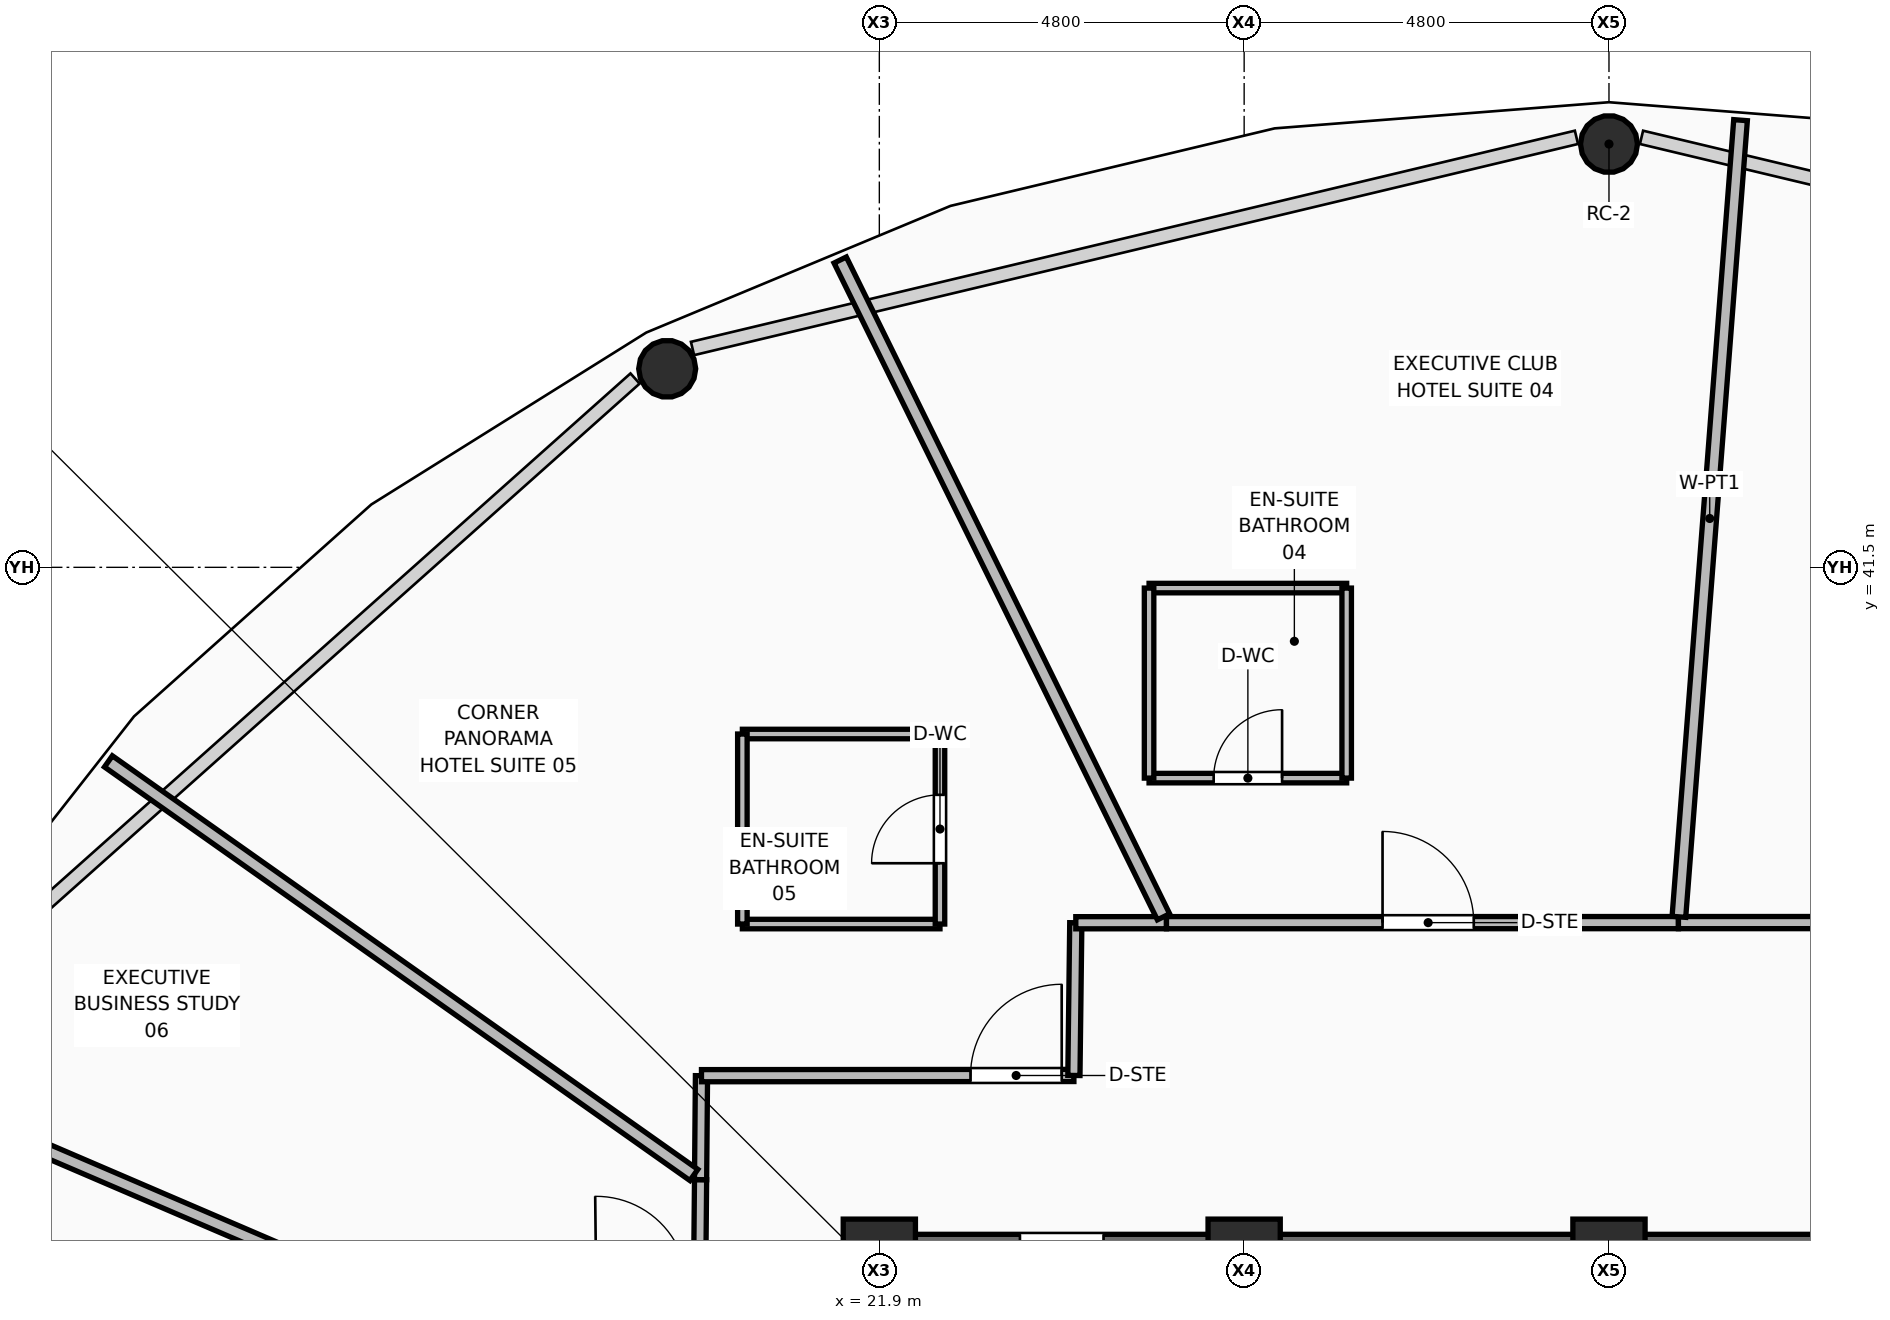
"""IFC4 building model, lengths in metres.
Left out: names, types, materials, properties, quantities, classifications, styles, units other than length and angle.
Written with IfcOpenShell. Run it as: python <this file> out.ifc"""

import sys

from ifc_helpers import new_model, si_unit, direction, frame, frame_2d, origin, origin_2d, place, context, subcontext, project, spatial, rectangle, hollow_circle, extrude, element, fill, save


model = new_model("IFC4")
c1 = context("Model", 3, precision=1e-05, world=origin(), true_north=direction((0.0, 1.0)))
c2 = subcontext(c1, "Body", "Model", "MODEL_VIEW")
j1 = project(units=[si_unit("LENGTHUNIT", "METRE"), si_unit("PLANEANGLEUNIT", "RADIAN")], contexts=[c1])
p1 = place(None, origin())
s1 = spatial("IfcSite", under=j1, at=p1, CompositionType="ELEMENT")
p2 = place(p1, origin())
s2 = spatial("IfcBuilding", under=s1, at=p2, CompositionType="ELEMENT")
p3 = place(p2, frame((0.0, 0.0, 149.7)))
s3 = spatial("IfcBuildingStorey", under=s2, at=p3, CompositionType="ELEMENT", Elevation=149.7)
for number, where, z_axis, x_axis in (
    (1, (21.9, 32.45, 0.0), (0.0, 0.0, 1.0), (1.0, 0.0, 0.0)),
    (2, (26.7, 32.45, 0.0), (0.0, 0.0, 1.0), (1.0, 0.0, 0.0)),
    (3, (31.5, 32.45, 0.0), (0.0, 0.0, 1.0), (1.0, 0.0, 0.0)),
):
    element("IfcColumn", number, at=place(p3, frame(where, z_axis=z_axis, x_axis=x_axis)), inside=s3, PredefinedType="COLUMN", context=c2, shape_type="SweptSolid", body=[
        extrude(rectangle(XDim=0.95, YDim=0.95, at=origin_2d()), origin(), (0.0, 0.0, 1.0), 3.75),
    ])
for number, where, z_axis, x_axis in (
    (4, (31.5, 47.069, 0.0), (0.0, 0.0, 1.0), (1.0, 0.0, 0.0)),
    (5, (19.109, 44.112, 0.0), (0.0, 0.0, 1.0), (1.0, 0.0, 0.0)),
):
    element("IfcColumn", number, at=place(p3, frame(where, z_axis=z_axis, x_axis=x_axis)), inside=s3, PredefinedType="COLUMN", context=c2, shape_type="SweptSolid", body=[
        extrude(hollow_circle(Radius=0.375, WallThickness=0.035, at=origin_2d()), origin(), (0.0, 0.0, 1.0), 3.57),
    ])
p4 = place(p3, frame((21.625, 32.45, 0.0), z_axis=(0.0, 0.0, 1.0), x_axis=(1.0, 0.0, 0.0)))
e6 = element("IfcWall", 6, at=p4, inside=s3, PredefinedType="SHEAR", context=c2, shape_type="SweptSolid", body=[
    extrude(rectangle(XDim=19.75, YDim=0.55, at=frame_2d((9.875, 0.0))), origin(), (0.0, 0.0, 1.0), 3.57),
])
p5 = place(p4, frame((2.125, 0.0, 0.0)))
e7 = element("IfcOpeningElement", 7, at=p5, cuts=e6, PredefinedType="OPENING", context=c2, shape_type="SweptSolid", body=[
    extrude(rectangle(XDim=1.1, YDim=2.1, at=frame_2d((0.55, 1.05))), frame((0.0, 0.285, 0.0), z_axis=(0.0, -1.0, 0.0), x_axis=(1.0, 0.0, 0.0)), (0.0, 0.0, 1.0), 0.57),
])
p6 = place(p4, frame((15.515, 0.0, 0.0)))
e8 = element("IfcOpeningElement", 8, at=p6, cuts=e6, PredefinedType="OPENING", context=c2, shape_type="SweptSolid", body=[
    extrude(rectangle(XDim=1.0, YDim=2.1, at=frame_2d((0.5, 1.05))), frame((0.0, 0.285, 0.0), z_axis=(0.0, -1.0, 0.0), x_axis=(1.0, 0.0, 0.0)), (0.0, 0.0, 1.0), 0.57),
])
p7 = place(p4, frame((17.525, 0.0, 0.0)))
e9 = element("IfcOpeningElement", 9, at=p7, cuts=e6, PredefinedType="OPENING", context=c2, shape_type="SweptSolid", body=[
    extrude(rectangle(XDim=0.9, YDim=2.1, at=frame_2d((0.45, 1.05))), frame((0.0, 0.285, 0.0), z_axis=(0.0, -1.0, 0.0), x_axis=(1.0, 0.0, 0.0)), (0.0, 0.0, 1.0), 0.57),
])
p8 = place(p3, frame((19.535, 32.04, 0.0), z_axis=(0.0, 0.0, 1.0), x_axis=(0.009389257464, 0.999955919951, 0.0)))
e10 = element("IfcWall", 10, at=p8, inside=s3, PredefinedType="PARTITIONING", context=c2, shape_type="SweptSolid", body=[
    extrude(rectangle(XDim=1.404, YDim=0.16, at=frame_2d((0.702, 0.0))), origin(), (0.0, 0.0, 1.0), 3.006),
])
p9 = place(p3, frame((19.548, 33.444, 0.0), z_axis=(0.0, 0.0, 1.0), x_axis=(0.008744980606, 0.999961761926, 0.0)))
e11 = element("IfcWall", 11, at=p9, inside=s3, PredefinedType="PARTITIONING", context=c2, shape_type="SweptSolid", body=[
    extrude(rectangle(XDim=1.368, YDim=0.16, at=frame_2d((0.684, 0.0))), origin(), (0.0, 0.0, 1.0), 3.55),
])
p10 = place(p3, frame((19.56, 34.812, 0.0), z_axis=(0.0, 0.0, 1.0), x_axis=(0.999999821253, 0.000597907217, 0.0)))
e12 = element("IfcWall", 12, at=p10, inside=s3, PredefinedType="PARTITIONING", context=c2, shape_type="SweptSolid", body=[
    extrude(rectangle(XDim=4.9, YDim=0.16, at=frame_2d((2.45, 0.0))), origin(), (0.0, 0.0, 1.0), 3.006),
])
p11 = place(p10, frame((3.54, 0.0, 0.0)))
e13 = element("IfcOpeningElement", 13, at=p11, cuts=e12, PredefinedType="OPENING", context=c2, shape_type="SweptSolid", body=[
    extrude(rectangle(XDim=1.2, YDim=2.1, at=frame_2d((0.6, 1.05))), frame((0.0, 0.09, 0.0), z_axis=(0.0, -1.0, 0.0), x_axis=(1.0, 0.0, 0.0)), (0.0, 0.0, 1.0), 0.18),
])
p12 = place(p3, frame((24.46, 34.815, 0.0), z_axis=(0.0, 0.0, 1.0), x_axis=(0.01251572883, 0.999921675199, 0.0)))
e14 = element("IfcWall", 14, at=p12, inside=s3, PredefinedType="PARTITIONING", context=c2, shape_type="SweptSolid", body=[
    extrude(rectangle(XDim=2.009, YDim=0.16, at=frame_2d((1.005, 0.0))), origin(), (0.0, 0.0, 1.0), 3.55),
])
p13 = place(p3, frame((24.485, 36.824, 0.0), z_axis=(0.0, 0.0, 1.0), x_axis=(0.999999664894, 0.000818665301, 0.0)))
e15 = element("IfcWall", 15, at=p13, inside=s3, PredefinedType="PARTITIONING", context=c2, shape_type="SweptSolid", body=[
    extrude(rectangle(XDim=1.193, YDim=0.16, at=frame_2d((0.596, 0.0))), origin(), (0.0, 0.0, 1.0), 3.55),
])
p14 = place(p3, frame((25.678, 36.825, 0.0), z_axis=(0.0, 0.0, 1.0), x_axis=(0.999999989491, 0.000144974809, 0.0)))
e16 = element("IfcWall", 16, at=p14, inside=s3, PredefinedType="PARTITIONING", context=c2, shape_type="SweptSolid", body=[
    extrude(rectangle(XDim=6.736, YDim=0.16, at=frame_2d((3.368, 0.0))), origin(), (0.0, 0.0, 1.0), 3.006),
])
p15 = place(p14, frame((2.843, 0.0, 0.0)))
e17 = element("IfcOpeningElement", 17, at=p15, cuts=e16, PredefinedType="OPENING", context=c2, shape_type="SweptSolid", body=[
    extrude(rectangle(XDim=1.2, YDim=2.1, at=frame_2d((0.6, 1.05))), frame((0.0, 0.09, 0.0), z_axis=(0.0, -1.0, 0.0), x_axis=(1.0, 0.0, 0.0)), (0.0, 0.0, 1.0), 0.18),
])
p16 = place(p3, frame((32.414, 36.826, 0.0), z_axis=(0.0, 0.0, 1.0), x_axis=(0.999999987142, 0.000160359203, 0.0)))
e18 = element("IfcWall", 18, at=p16, inside=s3, PredefinedType="PARTITIONING", context=c2, shape_type="SweptSolid", body=[
    extrude(rectangle(XDim=6.09, YDim=0.16, at=frame_2d((3.045, 0.0))), origin(), (0.0, 0.0, 1.0), 3.55),
])
p17 = place(p16, frame((2.666, 0.0, 0.0)))
e19 = element("IfcOpeningElement", 19, at=p17, cuts=e18, PredefinedType="OPENING", context=c2, shape_type="SweptSolid", body=[
    extrude(rectangle(XDim=1.2, YDim=2.1, at=frame_2d((0.6, 1.05))), frame((0.0, 0.09, 0.0), z_axis=(0.0, -1.0, 0.0), x_axis=(1.0, 0.0, 0.0)), (0.0, 0.0, 1.0), 0.18),
])
p18 = place(p3, frame((32.42, 36.902, 0.0), z_axis=(0.0, 0.0, 1.0), x_axis=(0.077151140833, 0.997019408772, 0.0)))
e20 = element("IfcWall", 20, at=p18, inside=s3, PredefinedType="PARTITIONING", context=c2, shape_type="SweptSolid", body=[
    extrude(rectangle(XDim=10.512, YDim=0.18, at=frame_2d((5.256, 0.0))), origin(), (0.0, 0.0, 1.0), 2.852),
])
p19 = place(p3, frame((25.639, 36.902, 0.0), z_axis=(0.0, 0.0, 1.0), x_axis=(-0.44167900267, 0.897173148617, 0.0)))
e21 = element("IfcWall", 21, at=p19, inside=s3, PredefinedType="PARTITIONING", context=c2, shape_type="SweptSolid", body=[
    extrude(rectangle(XDim=9.631, YDim=0.18, at=frame_2d((4.815, 0.0))), origin(), (0.0, 0.0, 1.0), 2.852),
])
p20 = place(p3, frame((19.46, 33.506, 0.0), z_axis=(0.0, 0.0, 1.0), x_axis=(-0.816788462003, 0.576937265513, 0.0)))
e22 = element("IfcWall", 22, at=p20, inside=s3, PredefinedType="PARTITIONING", context=c2, shape_type="SweptSolid", body=[
    extrude(rectangle(XDim=9.431, YDim=0.18, at=frame_2d((4.715, 0.0))), origin(), (0.0, 0.0, 1.0), 2.852),
])
p21 = place(p3, frame((16.925, 31.258, 0.0), z_axis=(0.0, 0.0, 1.0), x_axis=(-0.918899218309, 0.394492365694, 0.0)))
e23 = element("IfcWall", 23, at=p21, inside=s3, PredefinedType="PARTITIONING", context=c2, shape_type="SweptSolid", body=[
    extrude(rectangle(XDim=8.791, YDim=0.18, at=frame_2d((4.396, 0.0))), origin(), (0.0, 0.0, 1.0), 2.852),
])
p22 = place(p3, frame((25.449, 38.727, 0.0), z_axis=(0.0, 0.0, 1.0), x_axis=(1.0, 0.0, 0.0)))
e24 = element("IfcWall", 24, at=p22, inside=s3, PredefinedType="PARTITIONING", context=c2, shape_type="SweptSolid", body=[
    extrude(rectangle(XDim=2.6, YDim=0.125, at=frame_2d((1.3, 0.0))), origin(), (0.0, 0.0, 1.0), 3.55),
])
p23 = place(p22, frame((0.85, 0.0, 0.0)))
e25 = element("IfcOpeningElement", 25, at=p23, cuts=e24, PredefinedType="OPENING", context=c2, shape_type="SweptSolid", body=[
    extrude(rectangle(XDim=0.9, YDim=2.1, at=frame_2d((0.45, 1.05))), frame((0.0, 0.073, 0.0), z_axis=(0.0, -1.0, 0.0), x_axis=(1.0, 0.0, 0.0)), (0.0, 0.0, 1.0), 0.145),
])
p24 = place(p3, frame((25.449, 41.227, 0.0), z_axis=(0.0, 0.0, 1.0), x_axis=(1.0, 0.0, 0.0)))
e26 = element("IfcWall", 26, at=p24, inside=s3, PredefinedType="PARTITIONING", context=c2, shape_type="SweptSolid", body=[
    extrude(rectangle(XDim=2.6, YDim=0.125, at=frame_2d((1.3, 0.0))), origin(), (0.0, 0.0, 1.0), 3.55),
])
for number, where, z_axis, x_axis in (
    (27, (25.449, 38.727, 0.0), (0.0, 0.0, 1.0), (0.0, 1.0, 0.0)),
    (28, (28.049, 38.727, 0.0), (0.0, 0.0, 1.0), (0.0, 1.0, 0.0)),
):
    element("IfcWall", number, at=place(p3, frame(where, z_axis=z_axis, x_axis=x_axis)), inside=s3, PredefinedType="PARTITIONING", context=c2, shape_type="SweptSolid", body=[
        extrude(rectangle(XDim=2.5, YDim=0.125, at=frame_2d((1.25, 0.0))), origin(), (0.0, 0.0, 1.0), 3.55),
    ])
for number, where, z_axis, x_axis in (
    (29, (20.098, 36.807, 0.0), (0.0, 0.0, 1.0), (1.0, 0.0, 0.0)),
    (30, (20.098, 39.307, 0.0), (0.0, 0.0, 1.0), (1.0, 0.0, 0.0)),
):
    element("IfcWall", number, at=place(p3, frame(where, z_axis=z_axis, x_axis=x_axis)), inside=s3, PredefinedType="PARTITIONING", context=c2, shape_type="SweptSolid", body=[
        extrude(rectangle(XDim=2.6, YDim=0.125, at=frame_2d((1.3, 0.0))), origin(), (0.0, 0.0, 1.0), 3.006),
    ])
p25 = place(p3, frame((20.098, 36.807, 0.0), z_axis=(0.0, 0.0, 1.0), x_axis=(0.0, 1.0, 0.0)))
e31 = element("IfcWall", 31, at=p25, inside=s3, PredefinedType="PARTITIONING", context=c2, shape_type="SweptSolid", body=[
    extrude(rectangle(XDim=2.5, YDim=0.125, at=frame_2d((1.25, 0.0))), origin(), (0.0, 0.0, 1.0), 3.006),
])
p26 = place(p3, frame((22.698, 36.807, 0.0), z_axis=(0.0, 0.0, 1.0), x_axis=(0.0, 1.0, 0.0)))
e32 = element("IfcWall", 32, at=p26, inside=s3, PredefinedType="PARTITIONING", context=c2, shape_type="SweptSolid", body=[
    extrude(rectangle(XDim=2.5, YDim=0.125, at=frame_2d((1.25, 0.0))), origin(), (0.0, 0.0, 1.0), 3.55),
])
p27 = place(p26, frame((0.8, 0.0, 0.0)))
e33 = element("IfcOpeningElement", 33, at=p27, cuts=e32, PredefinedType="OPENING", context=c2, shape_type="SweptSolid", body=[
    extrude(rectangle(XDim=0.9, YDim=2.1, at=frame_2d((0.45, 1.05))), frame((0.0, 0.073, 0.0), z_axis=(0.0, -1.0, 0.0), x_axis=(1.0, 0.0, 0.0)), (0.0, 0.0, 1.0), 0.145),
])
p28 = place(p23, origin())
e34 = element("IfcDoor", 34, at=p28, inside=s3, OperationType="SINGLE_SWING_RIGHT", PredefinedType="DOOR", context=c2, shape_type="SweptSolid", body=[
    extrude(rectangle(XDim=0.9, YDim=2.1, at=frame_2d((0.45, 1.05))), frame((0.0, 0.025, 0.0), z_axis=(0.0, -1.0, 0.0), x_axis=(1.0, 0.0, 0.0)), (0.0, 0.0, 1.0), 0.05),
])
fill(e25, e34)
p29 = place(p15, origin())
e35 = element("IfcDoor", 35, at=p29, inside=s3, OperationType="SINGLE_SWING_LEFT", PredefinedType="DOOR", context=c2, shape_type="SweptSolid", body=[
    extrude(rectangle(XDim=1.2, YDim=2.1, at=frame_2d((0.6, 1.05))), frame((0.0, 0.025, 0.0), z_axis=(0.0, -1.0, 0.0), x_axis=(1.0, 0.0, 0.0)), (0.0, 0.0, 1.0), 0.05),
])
fill(e17, e35)
p30 = place(p27, origin())
e36 = element("IfcDoor", 36, at=p30, inside=s3, OperationType="SINGLE_SWING_LEFT", PredefinedType="DOOR", context=c2, shape_type="SweptSolid", body=[
    extrude(rectangle(XDim=0.9, YDim=2.1, at=frame_2d((0.45, 1.05))), frame((0.0, 0.025, 0.0), z_axis=(0.0, -1.0, 0.0), x_axis=(1.0, 0.0, 0.0)), (0.0, 0.0, 1.0), 0.05),
])
fill(e33, e36)
p31 = place(p11, origin())
e37 = element("IfcDoor", 37, at=p31, inside=s3, OperationType="SINGLE_SWING_RIGHT", PredefinedType="DOOR", context=c2, shape_type="SweptSolid", body=[
    extrude(rectangle(XDim=1.2, YDim=2.1, at=frame_2d((0.6, 1.05))), frame((0.0, 0.025, 0.0), z_axis=(0.0, -1.0, 0.0), x_axis=(1.0, 0.0, 0.0)), (0.0, 0.0, 1.0), 0.05),
])
fill(e13, e37)
save(model, sys.argv[1])
